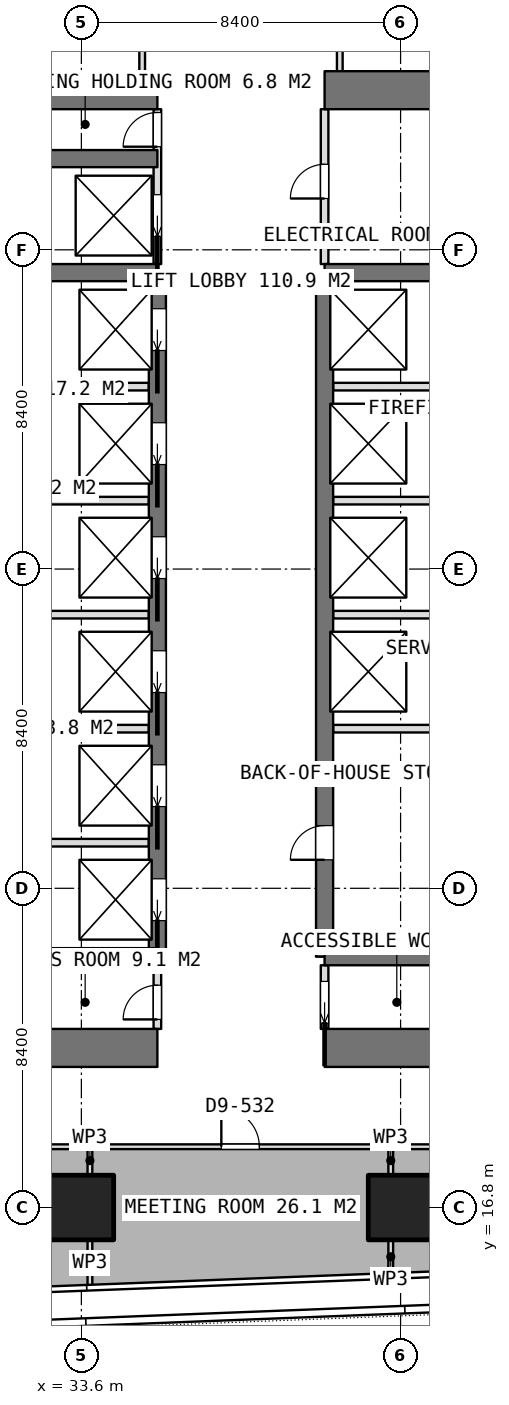
"""IFC4 building model, lengths in metres.
Left out: names, types, materials, properties, quantities, classifications, styles, units other than length and angle.
Written with IfcOpenShell. Run it as: python <this file> out.ifc"""

import sys

from ifc_helpers import new_model, si_unit, direction, frame, frame_2d, origin, origin_2d, place, context, subcontext, project, spatial, rectangle, extrude, element, fill, save


model = new_model("IFC4")
c1 = context("Model", 3, precision=1e-05, world=origin(), true_north=direction((0.0, 1.0)))
c2 = subcontext(c1, "Body", "Model", "MODEL_VIEW")
j1 = project(units=[si_unit("LENGTHUNIT", "METRE"), si_unit("PLANEANGLEUNIT", "RADIAN")], contexts=[c1])
p1 = place(None, origin())
s1 = spatial("IfcSite", under=j1, at=p1, CompositionType="ELEMENT")
p2 = place(p1, origin())
s2 = spatial("IfcBuilding", under=s1, at=p2, CompositionType="ELEMENT")
p3 = place(p2, frame((0.0, 0.0, 136.55)))
s3 = spatial("IfcBuildingStorey", under=s2, at=p3, CompositionType="ELEMENT", Elevation=136.55)
p4 = place(p3, frame((25.2, 21.0, 0.0), z_axis=(0.0, 0.0, 1.0), x_axis=(1.0, 0.0, 0.0)))
e1 = element("IfcWall", 1, at=p4, inside=s3, PredefinedType="SHEAR", context=c2, shape_type="SweptSolid", body=[
    extrude(rectangle(XDim=10.4, YDim=1.0, at=frame_2d((5.2, 0.0))), origin(), (0.0, 0.0, 1.0), 3.75),
])
p5 = place(p3, frame((40.0, 21.0, 0.0), z_axis=(0.0, 0.0, 1.0), x_axis=(1.0, 0.0, 0.0)))
e2 = element("IfcWall", 2, at=p5, inside=s3, PredefinedType="SHEAR", context=c2, shape_type="SweptSolid", body=[
    extrude(rectangle(XDim=10.4, YDim=1.0, at=frame_2d((5.2, 0.0))), origin(), (0.0, 0.0, 1.0), 3.75),
])
p6 = place(p3, frame((25.2, 46.2, 0.0), z_axis=(0.0, 0.0, 1.0), x_axis=(1.0, 0.0, 0.0)))
e3 = element("IfcWall", 3, at=p6, inside=s3, PredefinedType="SHEAR", context=c2, shape_type="SweptSolid", body=[
    extrude(rectangle(XDim=10.4, YDim=1.0, at=frame_2d((5.2, 0.0))), origin(), (0.0, 0.0, 1.0), 3.75),
])
p7 = place(p3, frame((40.0, 46.2, 0.0), z_axis=(0.0, 0.0, 1.0), x_axis=(1.0, 0.0, 0.0)))
e4 = element("IfcWall", 4, at=p7, inside=s3, PredefinedType="SHEAR", context=c2, shape_type="SweptSolid", body=[
    extrude(rectangle(XDim=10.4, YDim=1.0, at=frame_2d((5.2, 0.0))), origin(), (0.0, 0.0, 1.0), 3.75),
])
p8 = place(p3, frame((35.6, 23.4, 0.0), z_axis=(0.0, 0.0, 1.0), x_axis=(0.0, 1.0, 0.0)))
e5 = element("IfcWall", 5, at=p8, inside=s3, PredefinedType="SHEAR", context=c2, shape_type="SweptSolid", body=[
    extrude(rectangle(XDim=18.0, YDim=0.45, at=frame_2d((9.0, 0.0))), origin(), (0.0, 0.0, 1.0), 3.75),
])
p9 = place(p8, frame((0.95, 0.0, 0.0)))
e6 = element("IfcOpeningElement", 6, at=p9, cuts=e5, PredefinedType="OPENING", context=c2, shape_type="SweptSolid", body=[
    extrude(rectangle(XDim=1.1, YDim=2.1, at=frame_2d((0.55, 1.05))), frame((0.0, 0.235, 0.0), z_axis=(0.0, -1.0, 0.0), x_axis=(1.0, 0.0, 0.0)), (0.0, 0.0, 1.0), 0.47),
])
p10 = place(p8, frame((3.95, 0.0, 0.0)))
e7 = element("IfcOpeningElement", 7, at=p10, cuts=e5, PredefinedType="OPENING", context=c2, shape_type="SweptSolid", body=[
    extrude(rectangle(XDim=1.1, YDim=2.1, at=frame_2d((0.55, 1.05))), frame((0.0, 0.235, 0.0), z_axis=(0.0, -1.0, 0.0), x_axis=(1.0, 0.0, 0.0)), (0.0, 0.0, 1.0), 0.47),
])
p11 = place(p8, frame((6.95, 0.0, 0.0)))
e8 = element("IfcOpeningElement", 8, at=p11, cuts=e5, PredefinedType="OPENING", context=c2, shape_type="SweptSolid", body=[
    extrude(rectangle(XDim=1.1, YDim=2.1, at=frame_2d((0.55, 1.05))), frame((0.0, 0.235, 0.0), z_axis=(0.0, -1.0, 0.0), x_axis=(1.0, 0.0, 0.0)), (0.0, 0.0, 1.0), 0.47),
])
p12 = place(p8, frame((9.95, 0.0, 0.0)))
e9 = element("IfcOpeningElement", 9, at=p12, cuts=e5, PredefinedType="OPENING", context=c2, shape_type="SweptSolid", body=[
    extrude(rectangle(XDim=1.1, YDim=2.1, at=frame_2d((0.55, 1.05))), frame((0.0, 0.235, 0.0), z_axis=(0.0, -1.0, 0.0), x_axis=(1.0, 0.0, 0.0)), (0.0, 0.0, 1.0), 0.47),
])
p13 = place(p8, frame((12.95, 0.0, 0.0)))
e10 = element("IfcOpeningElement", 10, at=p13, cuts=e5, PredefinedType="OPENING", context=c2, shape_type="SweptSolid", body=[
    extrude(rectangle(XDim=1.1, YDim=2.1, at=frame_2d((0.55, 1.05))), frame((0.0, 0.235, 0.0), z_axis=(0.0, -1.0, 0.0), x_axis=(1.0, 0.0, 0.0)), (0.0, 0.0, 1.0), 0.47),
])
p14 = place(p8, frame((15.95, 0.0, 0.0)))
e11 = element("IfcOpeningElement", 11, at=p14, cuts=e5, PredefinedType="OPENING", context=c2, shape_type="SweptSolid", body=[
    extrude(rectangle(XDim=1.1, YDim=2.1, at=frame_2d((0.55, 1.05))), frame((0.0, 0.235, 0.0), z_axis=(0.0, -1.0, 0.0), x_axis=(1.0, 0.0, 0.0)), (0.0, 0.0, 1.0), 0.47),
])
p15 = place(p3, frame((40.0, 23.4, 0.0), z_axis=(0.0, 0.0, 1.0), x_axis=(0.0, 1.0, 0.0)))
e12 = element("IfcWall", 12, at=p15, inside=s3, PredefinedType="SHEAR", context=c2, shape_type="SweptSolid", body=[
    extrude(rectangle(XDim=18.0, YDim=0.45, at=frame_2d((9.0, 0.0))), origin(), (0.0, 0.0, 1.0), 3.75),
])
p16 = place(p15, frame((2.55, 0.0, 0.0)))
e13 = element("IfcOpeningElement", 13, at=p16, cuts=e12, PredefinedType="OPENING", context=c2, shape_type="SweptSolid", body=[
    extrude(rectangle(XDim=0.9, YDim=2.1, at=frame_2d((0.45, 1.05))), frame((0.0, 0.235, 0.0), z_axis=(0.0, -1.0, 0.0), x_axis=(1.0, 0.0, 0.0)), (0.0, 0.0, 1.0), 0.47),
])
for number, where, z_axis, x_axis in (
    (14, (31.8, 23.4, 0.0), (0.0, 0.0, 1.0), (1.0, 0.0, 0.0)),
    (15, (31.8, 41.4, 0.0), (0.0, 0.0, 1.0), (1.0, 0.0, 0.0)),
    (16, (31.8, 44.4, 0.0), (0.0, 0.0, 1.0), (1.0, 0.0, 0.0)),
    (17, (40.0, 23.4, 0.0), (0.0, 0.0, 1.0), (1.0, 0.0, 0.0)),
    (18, (40.0, 41.4, 0.0), (0.0, 0.0, 1.0), (1.0, 0.0, 0.0)),
):
    element("IfcWall", number, at=place(p3, frame(where, z_axis=z_axis, x_axis=x_axis)), inside=s3, PredefinedType="SHEAR", context=c2, shape_type="SweptSolid", body=[
        extrude(rectangle(XDim=3.8, YDim=0.45, at=frame_2d((1.9, 0.0))), origin(), (0.0, 0.0, 1.0), 3.75),
    ])
for number, where, z_axis, x_axis in (
    (19, (33.6, 16.8, 0.0), (0.0, 0.0, 1.0), (1.0, 0.0, 0.0)),
    (20, (42.0, 16.8, 0.0), (0.0, 0.0, 1.0), (1.0, 0.0, 0.0)),
):
    element("IfcColumn", number, at=place(p3, frame(where, z_axis=z_axis, x_axis=x_axis)), inside=s3, PredefinedType="COLUMN", context=c2, shape_type="SweptSolid", body=[
        extrude(rectangle(XDim=1.7, YDim=1.7, at=origin_2d()), origin(), (0.0, 0.0, 1.0), 3.75),
    ])
for number, where, z_axis, x_axis in (
    (21, (32.025, 26.4, 0.0), (0.0, 0.0, 1.0), (1.0, 0.0, 0.0)),
    (22, (32.025, 29.4, 0.0), (0.0, 0.0, 1.0), (1.0, 0.0, 0.0)),
    (23, (32.025, 32.4, 0.0), (0.0, 0.0, 1.0), (1.0, 0.0, 0.0)),
    (24, (32.025, 35.4, 0.0), (0.0, 0.0, 1.0), (1.0, 0.0, 0.0)),
    (25, (32.025, 38.4, 0.0), (0.0, 0.0, 1.0), (1.0, 0.0, 0.0)),
):
    element("IfcWall", number, at=place(p3, frame(where, z_axis=z_axis, x_axis=x_axis)), inside=s3, PredefinedType="PARTITIONING", context=c2, shape_type="SweptSolid", body=[
        extrude(rectangle(XDim=3.35, YDim=0.2, at=frame_2d((1.675, 0.0))), origin(), (0.0, 0.0, 1.0), 3.5),
    ])
for number, where, z_axis, x_axis in (
    (26, (40.225, 29.4, 0.0), (0.0, 0.0, 1.0), (1.0, 0.0, 0.0)),
    (27, (40.225, 32.4, 0.0), (0.0, 0.0, 1.0), (1.0, 0.0, 0.0)),
    (28, (40.225, 35.4, 0.0), (0.0, 0.0, 1.0), (1.0, 0.0, 0.0)),
    (29, (40.225, 38.4, 0.0), (0.0, 0.0, 1.0), (1.0, 0.0, 0.0)),
):
    element("IfcWall", number, at=place(p3, frame(where, z_axis=z_axis, x_axis=x_axis)), inside=s3, PredefinedType="PARTITIONING", context=c2, shape_type="SweptSolid", body=[
        extrude(rectangle(XDim=3.35, YDim=0.2, at=frame_2d((1.675, 0.0))), origin(), (0.0, 0.0, 1.0), 3.5),
    ])
p17 = place(p3, frame((40.0, 21.5, 0.0), z_axis=(0.0, 0.0, 1.0), x_axis=(0.0, 1.0, 0.0)))
e30 = element("IfcWall", 30, at=p17, inside=s3, PredefinedType="PARTITIONING", context=c2, shape_type="SweptSolid", body=[
    extrude(rectangle(XDim=1.675, YDim=0.2, at=frame_2d((0.837, 0.0))), origin(), (0.0, 0.0, 1.0), 3.5),
])
p18 = place(p17, frame((0.15, 0.0, 0.0)))
e31 = element("IfcOpeningElement", 31, at=p18, cuts=e30, PredefinedType="OPENING", context=c2, shape_type="SweptSolid", body=[
    extrude(rectangle(XDim=1.1, YDim=2.1, at=frame_2d((0.55, 1.05))), frame((0.0, 0.11, 0.0), z_axis=(0.0, -1.0, 0.0), x_axis=(1.0, 0.0, 0.0)), (0.0, 0.0, 1.0), 0.22),
])
p19 = place(p3, frame((40.0, 41.625, 0.0), z_axis=(0.0, 0.0, 1.0), x_axis=(0.0, 1.0, 0.0)))
e32 = element("IfcWall", 32, at=p19, inside=s3, PredefinedType="PARTITIONING", context=c2, shape_type="SweptSolid", body=[
    extrude(rectangle(XDim=4.075, YDim=0.2, at=frame_2d((2.038, 0.0))), origin(), (0.0, 0.0, 1.0), 3.5),
])
p20 = place(p19, frame((1.725, 0.0, 0.0)))
e33 = element("IfcOpeningElement", 33, at=p20, cuts=e32, PredefinedType="OPENING", context=c2, shape_type="SweptSolid", body=[
    extrude(rectangle(XDim=0.9, YDim=2.1, at=frame_2d((0.45, 1.05))), frame((0.0, 0.11, 0.0), z_axis=(0.0, -1.0, 0.0), x_axis=(1.0, 0.0, 0.0)), (0.0, 0.0, 1.0), 0.22),
])
p21 = place(p3, frame((35.6, 41.625, 0.0), z_axis=(0.0, 0.0, 1.0), x_axis=(0.0, 1.0, 0.0)))
e34 = element("IfcWall", 34, at=p21, inside=s3, PredefinedType="PARTITIONING", context=c2, shape_type="SweptSolid", body=[
    extrude(rectangle(XDim=4.075, YDim=0.2, at=frame_2d((2.038, 0.0))), origin(), (0.0, 0.0, 1.0), 3.5),
])
p22 = place(p21, frame((3.088, 0.0, 0.0)))
e35 = element("IfcOpeningElement", 35, at=p22, cuts=e34, PredefinedType="OPENING", context=c2, shape_type="SweptSolid", body=[
    extrude(rectangle(XDim=0.9, YDim=2.1, at=frame_2d((0.45, 1.05))), frame((0.0, 0.11, 0.0), z_axis=(0.0, -1.0, 0.0), x_axis=(1.0, 0.0, 0.0)), (0.0, 0.0, 1.0), 0.22),
])
p23 = place(p21, frame((0.725, 0.0, 0.0)))
e36 = element("IfcOpeningElement", 36, at=p23, cuts=e34, PredefinedType="OPENING", context=c2, shape_type="SweptSolid", body=[
    extrude(rectangle(XDim=1.1, YDim=2.1, at=frame_2d((0.55, 1.05))), frame((0.0, 0.11, 0.0), z_axis=(0.0, -1.0, 0.0), x_axis=(1.0, 0.0, 0.0)), (0.0, 0.0, 1.0), 0.22),
])
p24 = place(p3, frame((35.6, 21.5, 0.0), z_axis=(0.0, 0.0, 1.0), x_axis=(0.0, 1.0, 0.0)))
e37 = element("IfcWall", 37, at=p24, inside=s3, PredefinedType="PARTITIONING", context=c2, shape_type="SweptSolid", body=[
    extrude(rectangle(XDim=1.675, YDim=0.2, at=frame_2d((0.837, 0.0))), origin(), (0.0, 0.0, 1.0), 3.5),
])
p25 = place(p24, frame((0.25, 0.0, 0.0)))
e38 = element("IfcOpeningElement", 38, at=p25, cuts=e37, PredefinedType="OPENING", context=c2, shape_type="SweptSolid", body=[
    extrude(rectangle(XDim=0.9, YDim=2.1, at=frame_2d((0.45, 1.05))), frame((0.0, 0.11, 0.0), z_axis=(0.0, -1.0, 0.0), x_axis=(1.0, 0.0, 0.0)), (0.0, 0.0, 1.0), 0.22),
])
for number, where, z_axis, x_axis in (
    (39, (40.4, 46.7, 0.0), (0.0, 0.0, 1.0), (0.0, 1.0, 0.0)),
    (40, (35.2, 46.7, 0.0), (0.0, 0.0, 1.0), (0.0, 1.0, 0.0)),
):
    element("IfcWall", number, at=place(p3, frame(where, z_axis=z_axis, x_axis=x_axis)), inside=s3, PredefinedType="PARTITIONING", context=c2, shape_type="SweptSolid", body=[
        extrude(rectangle(XDim=2.625, YDim=0.15, at=frame_2d((1.312, 0.0))), origin(), (0.0, 0.0, 1.0), 3.5),
    ])
p26 = place(p3, frame((41.741, 18.4, 0.0), z_axis=(0.0, 0.0, 1.0), x_axis=(1.0, 0.0, 0.0)))
e41 = element("IfcWall", 41, at=p26, inside=s3, PredefinedType="PARTITIONING", context=c2, shape_type="SweptSolid", body=[
    extrude(rectangle(XDim=8.195, YDim=0.125, at=frame_2d((4.098, 0.0))), origin(), (0.0, 0.0, 1.0), 3.5),
])
p27 = place(p26, frame((3.597, 0.0, 0.0)))
e42 = element("IfcOpeningElement", 42, at=p27, cuts=e41, PredefinedType="OPENING", context=c2, shape_type="SweptSolid", body=[
    extrude(rectangle(XDim=1.0, YDim=2.1, at=frame_2d((0.5, 1.05))), frame((0.0, 0.073, 0.0), z_axis=(0.0, -1.0, 0.0), x_axis=(1.0, 0.0, 0.0)), (0.0, 0.0, 1.0), 0.145),
])
p28 = place(p3, frame((41.741, 15.08, 0.0), z_axis=(0.0, 0.0, 1.0), x_axis=(0.0, 1.0, 0.0)))
e43 = element("IfcWall", 43, at=p28, inside=s3, PredefinedType="PARTITIONING", context=c2, shape_type="SweptSolid", body=[
    extrude(rectangle(XDim=0.85, YDim=0.125, at=frame_2d((0.425, 0.0))), origin(), (0.0, 0.0, 1.0), 3.5),
])
p29 = place(p3, frame((41.741, 17.67, 0.0), z_axis=(0.0, 0.0, 1.0), x_axis=(0.0, 1.0, 0.0)))
e44 = element("IfcWall", 44, at=p29, inside=s3, PredefinedType="PARTITIONING", context=c2, shape_type="SweptSolid", body=[
    extrude(rectangle(XDim=0.73, YDim=0.125, at=frame_2d((0.365, 0.0))), origin(), (0.0, 0.0, 1.0), 3.5),
])
p30 = place(p3, frame((25.38, 18.4, 0.0), z_axis=(0.0, 0.0, 1.0), x_axis=(1.0, 0.0, 0.0)))
e45 = element("IfcWall", 45, at=p30, inside=s3, PredefinedType="PARTITIONING", context=c2, shape_type="SweptSolid", body=[
    extrude(rectangle(XDim=8.445, YDim=0.125, at=frame_2d((4.223, 0.0))), origin(), (0.0, 0.0, 1.0), 3.5),
])
p31 = place(p30, frame((3.723, 0.0, 0.0)))
e46 = element("IfcOpeningElement", 46, at=p31, cuts=e45, PredefinedType="OPENING", context=c2, shape_type="SweptSolid", body=[
    extrude(rectangle(XDim=1.0, YDim=2.1, at=frame_2d((0.5, 1.05))), frame((0.0, 0.073, 0.0), z_axis=(0.0, -1.0, 0.0), x_axis=(1.0, 0.0, 0.0)), (0.0, 0.0, 1.0), 0.145),
])
p32 = place(p3, frame((33.825, 18.4, 0.0), z_axis=(0.0, 0.0, 1.0), x_axis=(0.0, -1.0, 0.0)))
e47 = element("IfcWall", 47, at=p32, inside=s3, PredefinedType="PARTITIONING", context=c2, shape_type="SweptSolid", body=[
    extrude(rectangle(XDim=0.73, YDim=0.125, at=frame_2d((0.365, 0.0))), origin(), (0.0, 0.0, 1.0), 3.5),
])
p33 = place(p3, frame((33.825, 15.93, 0.0), z_axis=(0.0, 0.0, 1.0), x_axis=(0.0, -1.0, 0.0)))
e48 = element("IfcWall", 48, at=p33, inside=s3, PredefinedType="PARTITIONING", context=c2, shape_type="SweptSolid", body=[
    extrude(rectangle(XDim=1.188, YDim=0.125, at=frame_2d((0.594, 0.0))), origin(), (0.0, 0.0, 1.0), 3.5),
])
p34 = place(p3, frame((33.826, 18.4, 0.0), z_axis=(0.0, 0.0, 1.0), x_axis=(1.0, 0.0, 0.0)))
e49 = element("IfcWall", 49, at=p34, inside=s3, PredefinedType="PARTITIONING", context=c2, shape_type="SweptSolid", body=[
    extrude(rectangle(XDim=7.914, YDim=0.125, at=frame_2d((3.957, 0.0))), origin(), (0.0, 0.0, 1.0), 3.5),
])
p35 = place(p34, frame((3.457, 0.0, 0.0)))
e50 = element("IfcOpeningElement", 50, at=p35, cuts=e49, PredefinedType="OPENING", context=c2, shape_type="SweptSolid", body=[
    extrude(rectangle(XDim=1.0, YDim=2.1, at=frame_2d((0.5, 1.05))), frame((0.0, 0.073, 0.0), z_axis=(0.0, -1.0, 0.0), x_axis=(1.0, 0.0, 0.0)), (0.0, 0.0, 1.0), 0.145),
])
p36 = place(p18, origin())
e51 = element("IfcDoor", 51, at=p36, inside=s3, OperationType="SLIDING_TO_LEFT", PredefinedType="DOOR", context=c2, shape_type="SweptSolid", body=[
    extrude(rectangle(XDim=1.1, YDim=2.1, at=frame_2d((0.55, 1.05))), frame((0.0, 0.025, 0.0), z_axis=(0.0, -1.0, 0.0), x_axis=(1.0, 0.0, 0.0)), (0.0, 0.0, 1.0), 0.05),
])
fill(e31, e51)
p37 = place(p25, origin())
e52 = element("IfcDoor", 52, at=p37, inside=s3, OperationType="SINGLE_SWING_LEFT", PredefinedType="DOOR", context=c2, shape_type="SweptSolid", body=[
    extrude(rectangle(XDim=0.9, YDim=2.1, at=frame_2d((0.45, 1.05))), frame((0.0, 0.025, 0.0), z_axis=(0.0, -1.0, 0.0), x_axis=(1.0, 0.0, 0.0)), (0.0, 0.0, 1.0), 0.05),
])
fill(e38, e52)
p38 = place(p20, origin())
e53 = element("IfcDoor", 53, at=p38, inside=s3, OperationType="SINGLE_SWING_LEFT", PredefinedType="DOOR", context=c2, shape_type="SweptSolid", body=[
    extrude(rectangle(XDim=0.9, YDim=2.1, at=frame_2d((0.45, 1.05))), frame((0.0, 0.025, 0.0), z_axis=(0.0, -1.0, 0.0), x_axis=(1.0, 0.0, 0.0)), (0.0, 0.0, 1.0), 0.05),
])
fill(e33, e53)
p39 = place(p16, origin())
e54 = element("IfcDoor", 54, at=p39, inside=s3, OperationType="SINGLE_SWING_LEFT", PredefinedType="DOOR", context=c2, shape_type="SweptSolid", body=[
    extrude(rectangle(XDim=0.9, YDim=2.1, at=frame_2d((0.45, 1.05))), frame((0.0, 0.025, 0.0), z_axis=(0.0, -1.0, 0.0), x_axis=(1.0, 0.0, 0.0)), (0.0, 0.0, 1.0), 0.05),
])
fill(e13, e54)
p40 = place(p22, origin())
e55 = element("IfcDoor", 55, at=p40, inside=s3, OperationType="SINGLE_SWING_LEFT", PredefinedType="DOOR", context=c2, shape_type="SweptSolid", body=[
    extrude(rectangle(XDim=0.9, YDim=2.1, at=frame_2d((0.45, 1.05))), frame((0.0, 0.025, 0.0), z_axis=(0.0, -1.0, 0.0), x_axis=(1.0, 0.0, 0.0)), (0.0, 0.0, 1.0), 0.05),
])
fill(e35, e55)
p41 = place(p9, origin())
e56 = element("IfcDoor", 56, at=p41, inside=s3, OperationType="SLIDING_TO_LEFT", PredefinedType="USERDEFINED", context=c2, shape_type="SweptSolid", body=[
    extrude(rectangle(XDim=1.1, YDim=2.1, at=frame_2d((0.55, 1.05))), frame((0.0, 0.025, 0.0), z_axis=(0.0, -1.0, 0.0), x_axis=(1.0, 0.0, 0.0)), (0.0, 0.0, 1.0), 0.05),
])
fill(e6, e56)
p42 = place(p10, origin())
e57 = element("IfcDoor", 57, at=p42, inside=s3, OperationType="SLIDING_TO_LEFT", PredefinedType="USERDEFINED", context=c2, shape_type="SweptSolid", body=[
    extrude(rectangle(XDim=1.1, YDim=2.1, at=frame_2d((0.55, 1.05))), frame((0.0, 0.025, 0.0), z_axis=(0.0, -1.0, 0.0), x_axis=(1.0, 0.0, 0.0)), (0.0, 0.0, 1.0), 0.05),
])
fill(e7, e57)
p43 = place(p11, origin())
e58 = element("IfcDoor", 58, at=p43, inside=s3, OperationType="SLIDING_TO_LEFT", PredefinedType="USERDEFINED", context=c2, shape_type="SweptSolid", body=[
    extrude(rectangle(XDim=1.1, YDim=2.1, at=frame_2d((0.55, 1.05))), frame((0.0, 0.025, 0.0), z_axis=(0.0, -1.0, 0.0), x_axis=(1.0, 0.0, 0.0)), (0.0, 0.0, 1.0), 0.05),
])
fill(e8, e58)
p44 = place(p12, origin())
e59 = element("IfcDoor", 59, at=p44, inside=s3, OperationType="SLIDING_TO_LEFT", PredefinedType="USERDEFINED", context=c2, shape_type="SweptSolid", body=[
    extrude(rectangle(XDim=1.1, YDim=2.1, at=frame_2d((0.55, 1.05))), frame((0.0, 0.025, 0.0), z_axis=(0.0, -1.0, 0.0), x_axis=(1.0, 0.0, 0.0)), (0.0, 0.0, 1.0), 0.05),
])
fill(e9, e59)
p45 = place(p13, origin())
e60 = element("IfcDoor", 60, at=p45, inside=s3, OperationType="SLIDING_TO_LEFT", PredefinedType="USERDEFINED", context=c2, shape_type="SweptSolid", body=[
    extrude(rectangle(XDim=1.1, YDim=2.1, at=frame_2d((0.55, 1.05))), frame((0.0, 0.025, 0.0), z_axis=(0.0, -1.0, 0.0), x_axis=(1.0, 0.0, 0.0)), (0.0, 0.0, 1.0), 0.05),
])
fill(e10, e60)
p46 = place(p14, origin())
e61 = element("IfcDoor", 61, at=p46, inside=s3, OperationType="SLIDING_TO_LEFT", PredefinedType="USERDEFINED", context=c2, shape_type="SweptSolid", body=[
    extrude(rectangle(XDim=1.1, YDim=2.1, at=frame_2d((0.55, 1.05))), frame((0.0, 0.025, 0.0), z_axis=(0.0, -1.0, 0.0), x_axis=(1.0, 0.0, 0.0)), (0.0, 0.0, 1.0), 0.05),
])
fill(e11, e61)
p47 = place(p23, origin())
e62 = element("IfcDoor", 62, at=p47, inside=s3, OperationType="SLIDING_TO_LEFT", PredefinedType="USERDEFINED", context=c2, shape_type="SweptSolid", body=[
    extrude(rectangle(XDim=1.1, YDim=2.1, at=frame_2d((0.55, 1.05))), frame((0.0, 0.025, 0.0), z_axis=(0.0, -1.0, 0.0), x_axis=(1.0, 0.0, 0.0)), (0.0, 0.0, 1.0), 0.05),
])
fill(e36, e62)
p48 = place(p35, origin())
e63 = element("IfcDoor", 63, at=p48, inside=s3, OperationType="SINGLE_SWING_LEFT", PredefinedType="DOOR", context=c2, shape_type="SweptSolid", body=[
    extrude(rectangle(XDim=1.0, YDim=2.1, at=frame_2d((0.5, 1.05))), frame((0.0, 0.025, 0.0), z_axis=(0.0, -1.0, 0.0), x_axis=(1.0, 0.0, 0.0)), (0.0, 0.0, 1.0), 0.05),
])
fill(e50, e63)
save(model, sys.argv[1])
